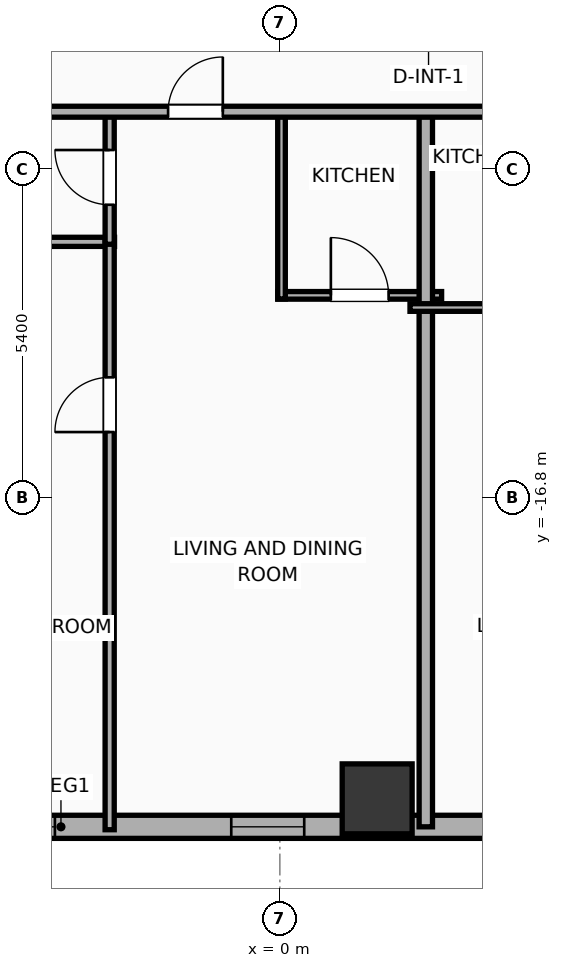
"""IFC4 building model, lengths in metres.
Left out: names, types, materials, properties, quantities, classifications, styles, units other than length and angle.
Written with IfcOpenShell. Run it as: python <this file> out.ifc"""

import sys

from ifc_helpers import new_model, si_unit, direction, frame, frame_2d, origin, origin_2d, place, context, subcontext, project, spatial, rectangle, hollow_rectangle, extrude, element, fill, save


model = new_model("IFC4")
c1 = context("Model", 3, precision=1e-05, world=origin(), true_north=direction((0.0, 1.0)))
c2 = subcontext(c1, "Body", "Model", "MODEL_VIEW")
j1 = project(units=[si_unit("LENGTHUNIT", "METRE"), si_unit("PLANEANGLEUNIT", "RADIAN")], contexts=[c1])
p1 = place(None, origin())
s1 = spatial("IfcSite", under=j1, at=p1, CompositionType="ELEMENT")
p2 = place(p1, origin())
s2 = spatial("IfcBuilding", under=s1, at=p2, CompositionType="ELEMENT")
p3 = place(p2, frame((0.0, 0.0, 72.8)))
s3 = spatial("IfcBuildingStorey", under=s2, at=p3, CompositionType="ELEMENT", Elevation=72.8)
p4 = place(p3, frame((1.6, -21.75, 0.0), z_axis=(0.0, 0.0, 1.0), x_axis=(1.0, 0.0, 0.0)))
e1 = element("IfcColumn", 1, at=p4, inside=s3, PredefinedType="COLUMN", context=c2, shape_type="SweptSolid", body=[
    extrude(hollow_rectangle(XDim=1.15, YDim=1.15, WallThickness=0.04, at=origin_2d()), origin(), (0.0, 0.0, 1.0), 3.9),
])
p5 = place(p3, frame((22.381, -22.21, 0.0), z_axis=(0.0, 0.0, 1.0), x_axis=(-1.0, 0.0, 0.0)))
e2 = element("IfcWall", 2, at=p5, inside=s3, PredefinedType="ELEMENTEDWALL", context=c2, shape_type="SweptSolid", body=[
    extrude(rectangle(XDim=51.963, YDim=0.38, at=frame_2d((25.981, 0.0))), origin(), (0.0, 0.0, 1.0), 3.65),
])
p6 = place(p5, frame((50.372, 0.0, 0.75)))
e3 = element("IfcOpeningElement", 3, at=p6, cuts=e2, PredefinedType="OPENING", context=c2, shape_type="SweptSolid", body=[
    extrude(rectangle(XDim=0.52, YDim=2.05, at=frame_2d((0.26, 1.025))), frame((0.0, 0.2, 0.0), z_axis=(0.0, -1.0, 0.0), x_axis=(1.0, 0.0, 0.0)), (0.0, 0.0, 1.0), 0.4),
])
p7 = place(p5, frame((45.681, 0.0, 0.75)))
e4 = element("IfcOpeningElement", 4, at=p7, cuts=e2, PredefinedType="OPENING", context=c2, shape_type="SweptSolid", body=[
    extrude(rectangle(XDim=1.2, YDim=2.05, at=frame_2d((0.6, 1.025))), frame((0.0, 0.2, 0.0), z_axis=(0.0, -1.0, 0.0), x_axis=(1.0, 0.0, 0.0)), (0.0, 0.0, 1.0), 0.4),
])
p8 = place(p5, frame((48.485, 0.0, 0.75)))
e5 = element("IfcOpeningElement", 5, at=p8, cuts=e2, PredefinedType="OPENING", context=c2, shape_type="SweptSolid", body=[
    extrude(rectangle(XDim=1.2, YDim=2.05, at=frame_2d((0.6, 1.025))), frame((0.0, 0.2, 0.0), z_axis=(0.0, -1.0, 0.0), x_axis=(1.0, 0.0, 0.0)), (0.0, 0.0, 1.0), 0.4),
])
p9 = place(p5, frame((42.426, 0.0, 0.75)))
e6 = element("IfcOpeningElement", 6, at=p9, cuts=e2, PredefinedType="OPENING", context=c2, shape_type="SweptSolid", body=[
    extrude(rectangle(XDim=1.2, YDim=2.05, at=frame_2d((0.6, 1.025))), frame((0.0, 0.2, 0.0), z_axis=(0.0, -1.0, 0.0), x_axis=(1.0, 0.0, 0.0)), (0.0, 0.0, 1.0), 0.4),
])
p10 = place(p5, frame((37.486, 0.0, 0.75)))
e7 = element("IfcOpeningElement", 7, at=p10, cuts=e2, PredefinedType="OPENING", context=c2, shape_type="SweptSolid", body=[
    extrude(rectangle(XDim=1.2, YDim=2.05, at=frame_2d((0.6, 1.025))), frame((0.0, 0.2, 0.0), z_axis=(0.0, -1.0, 0.0), x_axis=(1.0, 0.0, 0.0)), (0.0, 0.0, 1.0), 0.4),
])
p11 = place(p5, frame((33.386, 0.0, 0.75)))
e8 = element("IfcOpeningElement", 8, at=p11, cuts=e2, PredefinedType="OPENING", context=c2, shape_type="SweptSolid", body=[
    extrude(rectangle(XDim=1.2, YDim=2.05, at=frame_2d((0.6, 1.025))), frame((0.0, 0.2, 0.0), z_axis=(0.0, -1.0, 0.0), x_axis=(1.0, 0.0, 0.0)), (0.0, 0.0, 1.0), 0.4),
])
p12 = place(p5, frame((29.166, 0.0, 0.75)))
e9 = element("IfcOpeningElement", 9, at=p12, cuts=e2, PredefinedType="OPENING", context=c2, shape_type="SweptSolid", body=[
    extrude(rectangle(XDim=1.2, YDim=2.05, at=frame_2d((0.6, 1.025))), frame((0.0, 0.2, 0.0), z_axis=(0.0, -1.0, 0.0), x_axis=(1.0, 0.0, 0.0)), (0.0, 0.0, 1.0), 0.4),
])
p13 = place(p5, frame((26.081, 0.0, 0.75)))
e10 = element("IfcOpeningElement", 10, at=p13, cuts=e2, PredefinedType="OPENING", context=c2, shape_type="SweptSolid", body=[
    extrude(rectangle(XDim=1.2, YDim=2.05, at=frame_2d((0.6, 1.025))), frame((0.0, 0.2, 0.0), z_axis=(0.0, -1.0, 0.0), x_axis=(1.0, 0.0, 0.0)), (0.0, 0.0, 1.0), 0.4),
])
p14 = place(p5, frame((21.981, 0.0, 0.75)))
e11 = element("IfcOpeningElement", 11, at=p14, cuts=e2, PredefinedType="OPENING", context=c2, shape_type="SweptSolid", body=[
    extrude(rectangle(XDim=1.2, YDim=2.05, at=frame_2d((0.6, 1.025))), frame((0.0, 0.2, 0.0), z_axis=(0.0, -1.0, 0.0), x_axis=(1.0, 0.0, 0.0)), (0.0, 0.0, 1.0), 0.4),
])
p15 = place(p5, frame((16.986, 0.0, 0.75)))
e12 = element("IfcOpeningElement", 12, at=p15, cuts=e2, PredefinedType="OPENING", context=c2, shape_type="SweptSolid", body=[
    extrude(rectangle(XDim=1.2, YDim=2.05, at=frame_2d((0.6, 1.025))), frame((0.0, 0.2, 0.0), z_axis=(0.0, -1.0, 0.0), x_axis=(1.0, 0.0, 0.0)), (0.0, 0.0, 1.0), 0.4),
])
p16 = place(p5, frame((12.886, 0.0, 0.75)))
e13 = element("IfcOpeningElement", 13, at=p16, cuts=e2, PredefinedType="OPENING", context=c2, shape_type="SweptSolid", body=[
    extrude(rectangle(XDim=1.2, YDim=2.05, at=frame_2d((0.6, 1.025))), frame((0.0, 0.2, 0.0), z_axis=(0.0, -1.0, 0.0), x_axis=(1.0, 0.0, 0.0)), (0.0, 0.0, 1.0), 0.4),
])
p17 = place(p5, frame((8.306, 0.0, 0.75)))
e14 = element("IfcOpeningElement", 14, at=p17, cuts=e2, PredefinedType="OPENING", context=c2, shape_type="SweptSolid", body=[
    extrude(rectangle(XDim=1.2, YDim=2.05, at=frame_2d((0.6, 1.025))), frame((0.0, 0.2, 0.0), z_axis=(0.0, -1.0, 0.0), x_axis=(1.0, 0.0, 0.0)), (0.0, 0.0, 1.0), 0.4),
])
p18 = place(p5, frame((4.686, 0.0, 0.75)))
e15 = element("IfcOpeningElement", 15, at=p18, cuts=e2, PredefinedType="OPENING", context=c2, shape_type="SweptSolid", body=[
    extrude(rectangle(XDim=1.2, YDim=2.05, at=frame_2d((0.6, 1.025))), frame((0.0, 0.2, 0.0), z_axis=(0.0, -1.0, 0.0), x_axis=(1.0, 0.0, 0.0)), (0.0, 0.0, 1.0), 0.4),
])
p19 = place(p5, frame((1.635, 0.0, 0.75)))
e16 = element("IfcOpeningElement", 16, at=p19, cuts=e2, PredefinedType="OPENING", context=c2, shape_type="SweptSolid", body=[
    extrude(rectangle(XDim=1.2, YDim=2.05, at=frame_2d((0.6, 1.025))), frame((0.0, 0.2, 0.0), z_axis=(0.0, -1.0, 0.0), x_axis=(1.0, 0.0, 0.0)), (0.0, 0.0, 1.0), 0.4),
])
p20 = place(p3, frame((-6.06, -12.59, 0.0), z_axis=(0.0, 0.0, 1.0), x_axis=(1.0, 0.0, 0.0)))
e17 = element("IfcWall", 17, at=p20, inside=s3, PredefinedType="PLUMBINGWALL", context=c2, shape_type="SweptSolid", body=[
    extrude(rectangle(XDim=3.341, YDim=0.15, at=frame_2d((1.67, 0.0))), origin(), (0.0, 0.0, 1.0), 3.65),
])
p21 = place(p3, frame((-2.799, -22.258, 0.0), z_axis=(0.0, 0.0, 1.0), x_axis=(0.0, 1.0, 0.0)))
e18 = element("IfcWall", 18, at=p21, inside=s3, PredefinedType="PLUMBINGWALL", context=c2, shape_type="SweptSolid", body=[
    extrude(rectangle(XDim=9.708, YDim=0.15, at=frame_2d((4.854, 0.0))), origin(), (0.0, 0.0, 1.0), 3.65),
])
p22 = place(p21, frame((6.54, 0.0, 0.0)))
e19 = element("IfcOpeningElement", 19, at=p22, cuts=e18, PredefinedType="OPENING", context=c2, shape_type="SweptSolid", body=[
    extrude(rectangle(XDim=0.9, YDim=2.05, at=frame_2d((0.45, 1.025))), frame((0.0, 0.085, 0.0), z_axis=(0.0, -1.0, 0.0), x_axis=(1.0, 0.0, 0.0)), (0.0, 0.0, 1.0), 0.17),
])
p23 = place(p3, frame((-2.799, -12.63, 0.0), z_axis=(0.0, 0.0, 1.0), x_axis=(0.0, 1.0, 0.0)))
e20 = element("IfcWall", 20, at=p23, inside=s3, PredefinedType="PLUMBINGWALL", context=c2, shape_type="SweptSolid", body=[
    extrude(rectangle(XDim=2.2, YDim=0.15, at=frame_2d((1.1, 0.0))), origin(), (0.0, 0.0, 1.0), 3.65),
])
p24 = place(p23, frame((0.65, 0.0, 0.0)))
e21 = element("IfcOpeningElement", 21, at=p24, cuts=e20, PredefinedType="OPENING", context=c2, shape_type="SweptSolid", body=[
    extrude(rectangle(XDim=0.9, YDim=2.05, at=frame_2d((0.45, 1.025))), frame((0.0, 0.085, 0.0), z_axis=(0.0, -1.0, 0.0), x_axis=(1.0, 0.0, 0.0)), (0.0, 0.0, 1.0), 0.17),
])
p25 = place(p3, frame((-0.033, -13.47, 0.0), z_axis=(0.0, 0.0, 1.0), x_axis=(1.0, 0.0, 0.0)))
e22 = element("IfcWall", 22, at=p25, inside=s3, PredefinedType="PARTITIONING", context=c2, shape_type="SweptSolid", body=[
    extrude(rectangle(XDim=2.693, YDim=0.125, at=frame_2d((1.346, 0.0))), origin(), (0.0, 0.0, 1.0), 3.65),
])
p26 = place(p25, frame((0.872, 0.0, 0.0)))
e23 = element("IfcOpeningElement", 23, at=p26, cuts=e22, PredefinedType="OPENING", context=c2, shape_type="SweptSolid", body=[
    extrude(rectangle(XDim=0.95, YDim=2.05, at=frame_2d((0.475, 1.025))), frame((0.0, 0.073, 0.0), z_axis=(0.0, -1.0, 0.0), x_axis=(1.0, 0.0, 0.0)), (0.0, 0.0, 1.0), 0.145),
])
p27 = place(p3, frame((0.027, -13.53, 0.0), z_axis=(0.0, 0.0, 1.0), x_axis=(0.0, 1.0, 0.0)))
e24 = element("IfcWall", 24, at=p27, inside=s3, PredefinedType="PARTITIONING", context=c2, shape_type="SweptSolid", body=[
    extrude(rectangle(XDim=3.1, YDim=0.125, at=frame_2d((1.55, 0.0))), origin(), (0.0, 0.0, 1.0), 3.65),
])
p28 = place(p3, frame((2.4, -22.21, 0.0), z_axis=(0.0, 0.0, 1.0), x_axis=(0.0, 1.0, 0.0)))
e25 = element("IfcWall", 25, at=p28, inside=s3, PredefinedType="PARTITIONING", context=c2, shape_type="SweptSolid", body=[
    extrude(rectangle(XDim=11.84, YDim=0.22, at=frame_2d((5.92, 0.0))), origin(), (0.0, 0.0, 1.0), 2.94),
])
p29 = place(p3, frame((2.14, -13.67, 0.0), z_axis=(0.0, 0.0, 1.0), x_axis=(1.0, 0.0, 0.0)))
e26 = element("IfcWall", 26, at=p29, inside=s3, PredefinedType="PARTITIONING", context=c2, shape_type="SweptSolid", body=[
    extrude(rectangle(XDim=2.69, YDim=0.125, at=frame_2d((1.345, 0.0))), origin(), (0.0, 0.0, 1.0), 3.65),
])
p30 = place(p3, frame((-33.41, -10.45, 0.0), z_axis=(0.0, 0.0, 1.0), x_axis=(1.0, 0.0, 0.0)))
e27 = element("IfcWall", 27, at=p30, inside=s3, PredefinedType="PARTITIONING", context=c2, shape_type="SweptSolid", body=[
    extrude(rectangle(XDim=59.62, YDim=0.18, at=frame_2d((29.81, 0.0))), origin(), (0.0, 0.0, 1.0), 3.65),
])
p31 = place(p30, frame((2.495, 0.0, 0.0)))
e28 = element("IfcOpeningElement", 28, at=p31, cuts=e27, PredefinedType="OPENING", context=c2, shape_type="SweptSolid", body=[
    extrude(rectangle(XDim=0.9, YDim=2.05, at=frame_2d((0.45, 1.025))), frame((0.0, 0.1, 0.0), z_axis=(0.0, -1.0, 0.0), x_axis=(1.0, 0.0, 0.0)), (0.0, 0.0, 1.0), 0.2),
])
p32 = place(p30, frame((8.905, 0.0, 0.0)))
e29 = element("IfcOpeningElement", 29, at=p32, cuts=e27, PredefinedType="OPENING", context=c2, shape_type="SweptSolid", body=[
    extrude(rectangle(XDim=1.15, YDim=2.05, at=frame_2d((0.575, 1.025))), frame((0.0, 0.1, 0.0), z_axis=(0.0, -1.0, 0.0), x_axis=(1.0, 0.0, 0.0)), (0.0, 0.0, 1.0), 0.2),
])
p33 = place(p30, frame((14.902, 0.0, 0.0)))
e30 = element("IfcOpeningElement", 30, at=p33, cuts=e27, PredefinedType="OPENING", context=c2, shape_type="SweptSolid", body=[
    extrude(rectangle(XDim=1.15, YDim=2.05, at=frame_2d((0.575, 1.025))), frame((0.0, 0.1, 0.0), z_axis=(0.0, -1.0, 0.0), x_axis=(1.0, 0.0, 0.0)), (0.0, 0.0, 1.0), 0.2),
])
p34 = place(p30, frame((23.112, 0.0, 0.0)))
e31 = element("IfcOpeningElement", 31, at=p34, cuts=e27, PredefinedType="OPENING", context=c2, shape_type="SweptSolid", body=[
    extrude(rectangle(XDim=1.15, YDim=2.05, at=frame_2d((0.575, 1.025))), frame((0.0, 0.1, 0.0), z_axis=(0.0, -1.0, 0.0), x_axis=(1.0, 0.0, 0.0)), (0.0, 0.0, 1.0), 0.2),
])
p35 = place(p30, frame((31.572, 0.0, 0.0)))
e32 = element("IfcOpeningElement", 32, at=p35, cuts=e27, PredefinedType="OPENING", context=c2, shape_type="SweptSolid", body=[
    extrude(rectangle(XDim=0.9, YDim=2.05, at=frame_2d((0.45, 1.025))), frame((0.0, 0.1, 0.0), z_axis=(0.0, -1.0, 0.0), x_axis=(1.0, 0.0, 0.0)), (0.0, 0.0, 1.0), 0.2),
])
p36 = place(p30, frame((39.502, 0.0, 0.0)))
e33 = element("IfcOpeningElement", 33, at=p36, cuts=e27, PredefinedType="OPENING", context=c2, shape_type="SweptSolid", body=[
    extrude(rectangle(XDim=1.15, YDim=2.05, at=frame_2d((0.575, 1.025))), frame((0.0, 0.1, 0.0), z_axis=(0.0, -1.0, 0.0), x_axis=(1.0, 0.0, 0.0)), (0.0, 0.0, 1.0), 0.2),
])
p37 = place(p30, frame((47.699, 0.0, 0.0)))
e34 = element("IfcOpeningElement", 34, at=p37, cuts=e27, PredefinedType="OPENING", context=c2, shape_type="SweptSolid", body=[
    extrude(rectangle(XDim=1.15, YDim=2.05, at=frame_2d((0.575, 1.025))), frame((0.0, 0.1, 0.0), z_axis=(0.0, -1.0, 0.0), x_axis=(1.0, 0.0, 0.0)), (0.0, 0.0, 1.0), 0.2),
])
p38 = place(p30, frame((55.539, 0.0, 0.0)))
e35 = element("IfcOpeningElement", 35, at=p38, cuts=e27, PredefinedType="OPENING", context=c2, shape_type="SweptSolid", body=[
    extrude(rectangle(XDim=1.15, YDim=2.05, at=frame_2d((0.575, 1.025))), frame((0.0, 0.1, 0.0), z_axis=(0.0, -1.0, 0.0), x_axis=(1.0, 0.0, 0.0)), (0.0, 0.0, 1.0), 0.2),
])
p39 = place(p13, origin())
e36 = element("IfcWindow", 36, at=p39, inside=s3, PartitioningType="SINGLE_PANEL", PredefinedType="WINDOW", context=c2, shape_type="SweptSolid", body=[
    extrude(rectangle(XDim=1.2, YDim=2.05, at=frame_2d((0.6, 1.025))), frame((0.0, 0.03, 0.0), z_axis=(0.0, -1.0, 0.0), x_axis=(1.0, 0.0, 0.0)), (0.0, 0.0, 1.0), 0.06),
])
fill(e10, e36)
p40 = place(p14, origin())
e37 = element("IfcWindow", 37, at=p40, inside=s3, PartitioningType="SINGLE_PANEL", PredefinedType="WINDOW", context=c2, shape_type="SweptSolid", body=[
    extrude(rectangle(XDim=1.2, YDim=2.05, at=frame_2d((0.6, 1.025))), frame((0.0, 0.03, 0.0), z_axis=(0.0, -1.0, 0.0), x_axis=(1.0, 0.0, 0.0)), (0.0, 0.0, 1.0), 0.06),
])
fill(e11, e37)
p41 = place(p22, origin())
e38 = element("IfcDoor", 38, at=p41, inside=s3, OperationType="SINGLE_SWING_LEFT", PredefinedType="DOOR", context=c2, shape_type="SweptSolid", body=[
    extrude(rectangle(XDim=0.9, YDim=2.05, at=frame_2d((0.45, 1.025))), frame((0.0, 0.025, 0.0), z_axis=(0.0, -1.0, 0.0), x_axis=(1.0, 0.0, 0.0)), (0.0, 0.0, 1.0), 0.05),
])
fill(e19, e38)
p42 = place(p24, origin())
e39 = element("IfcDoor", 39, at=p42, inside=s3, OperationType="SINGLE_SWING_RIGHT", PredefinedType="DOOR", context=c2, shape_type="SweptSolid", body=[
    extrude(rectangle(XDim=0.9, YDim=2.05, at=frame_2d((0.45, 1.025))), frame((0.0, 0.025, 0.0), z_axis=(0.0, -1.0, 0.0), x_axis=(1.0, 0.0, 0.0)), (0.0, 0.0, 1.0), 0.05),
])
fill(e21, e39)
p43 = place(p26, origin())
e40 = element("IfcDoor", 40, at=p43, inside=s3, OperationType="SINGLE_SWING_LEFT", PredefinedType="DOOR", context=c2, shape_type="SweptSolid", body=[
    extrude(rectangle(XDim=0.95, YDim=2.05, at=frame_2d((0.475, 1.025))), frame((0.0, 0.025, 0.0), z_axis=(0.0, -1.0, 0.0), x_axis=(1.0, 0.0, 0.0)), (0.0, 0.0, 1.0), 0.05),
])
fill(e23, e40)
p44 = place(p35, origin())
e41 = element("IfcDoor", 41, at=p44, inside=s3, OperationType="SINGLE_SWING_RIGHT", PredefinedType="DOOR", context=c2, shape_type="SweptSolid", body=[
    extrude(rectangle(XDim=0.9, YDim=2.05, at=frame_2d((0.45, 1.025))), frame((0.0, 0.025, 0.0), z_axis=(0.0, -1.0, 0.0), x_axis=(1.0, 0.0, 0.0)), (0.0, 0.0, 1.0), 0.05),
])
fill(e32, e41)
save(model, sys.argv[1])
